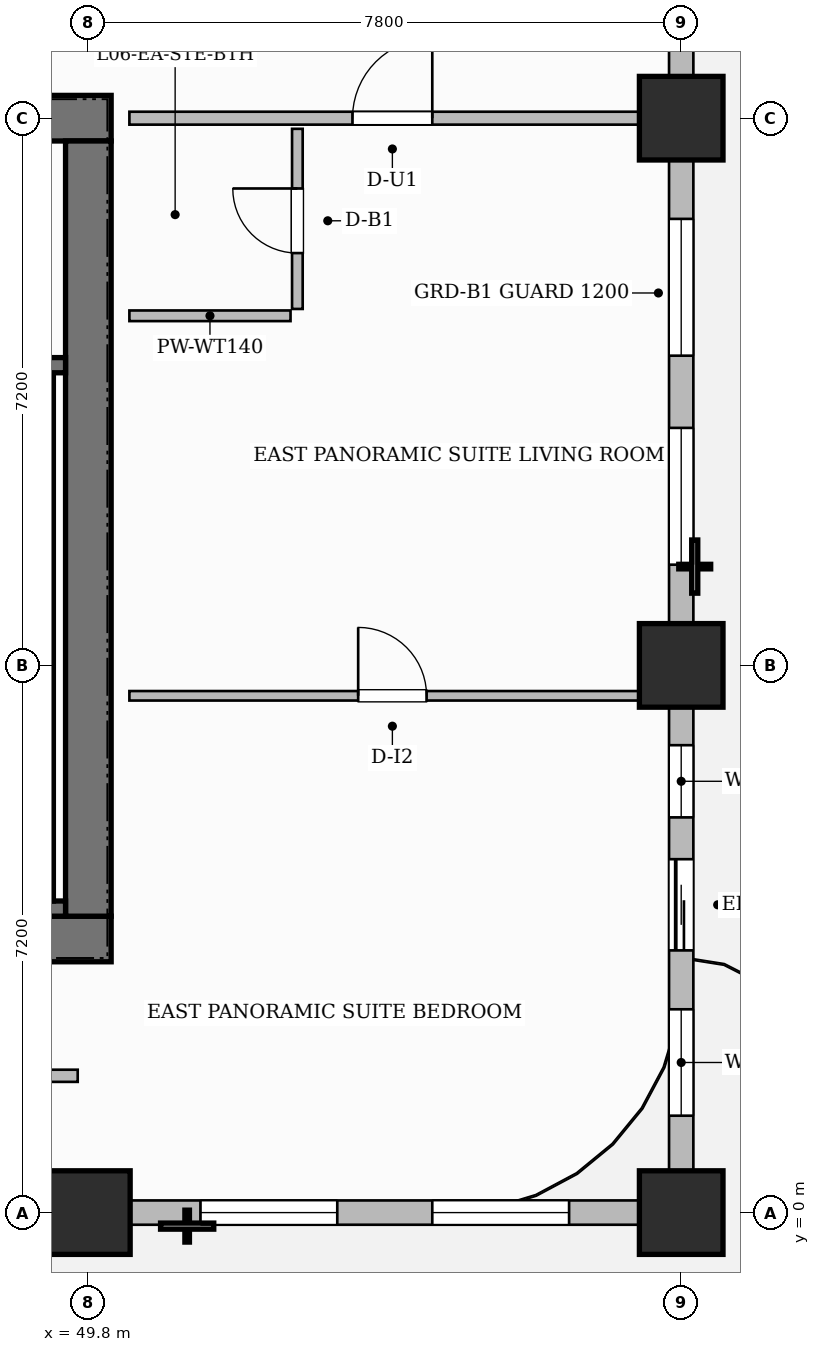
"""IFC4 building model, lengths in metres.
Left out: names, types, materials, properties, quantities, classifications, styles, units other than length and angle.
Written with IfcOpenShell. Run it as: python <this file> out.ifc"""

import sys

from ifc_helpers import new_model, si_unit, direction, frame, frame_2d, origin, origin_2d, place, context, subcontext, project, spatial, rectangle, extrude, source, transform, mapped, element, fill, save


model = new_model("IFC4")
c1 = context("Model", 3, precision=1e-05, world=origin(), true_north=direction((0.0, 1.0)))
c2 = subcontext(c1, "Body", "Model", "MODEL_VIEW")
j1 = project(units=[si_unit("LENGTHUNIT", "METRE"), si_unit("PLANEANGLEUNIT", "RADIAN")], contexts=[c1])
p1 = place(None, origin())
s1 = spatial("IfcSite", under=j1, at=p1, CompositionType="ELEMENT")
p2 = place(p1, origin())
s2 = spatial("IfcBuilding", under=s1, at=p2, CompositionType="ELEMENT")
p3 = place(p2, frame((0.0, 0.0, 32.4)))
s3 = spatial("IfcBuildingStorey", under=s2, at=p3, CompositionType="ELEMENT", Elevation=32.4)
p4 = place(p3, frame((34.5, 3.6, 0.0), z_axis=(0.0, 0.0, 1.0), x_axis=(1.0, 0.0, 0.0)))
e1 = element("IfcWall", 1, at=p4, inside=s3, PredefinedType="SHEAR", context=c2, shape_type="SweptSolid", body=[
    extrude(rectangle(XDim=15.6, YDim=0.6, at=frame_2d((7.8, 0.0))), origin(), (0.0, 0.0, 1.0), 3.7),
])
p5 = place(p4, frame((4.5, 0.0, 0.0)))
e2 = element("IfcOpeningElement", 2, at=p5, cuts=e1, PredefinedType="OPENING", context=c2, shape_type="SweptSolid", body=[
    extrude(rectangle(XDim=0.9, YDim=2.1, at=frame_2d((0.45, 1.05))), frame((0.0, 0.31, 0.0), z_axis=(0.0, -1.0, 0.0), x_axis=(1.0, 0.0, 0.0)), (0.0, 0.0, 1.0), 0.62),
])
p6 = place(p4, frame((6.95, 0.0, 0.0)))
e3 = element("IfcOpeningElement", 3, at=p6, cuts=e1, PredefinedType="OPENING", context=c2, shape_type="SweptSolid", body=[
    extrude(rectangle(XDim=0.9, YDim=2.1, at=frame_2d((0.45, 1.05))), frame((0.0, 0.31, 0.0), z_axis=(0.0, -1.0, 0.0), x_axis=(1.0, 0.0, 0.0)), (0.0, 0.0, 1.0), 0.62),
])
p7 = place(p3, frame((34.5, 14.4, 0.0), z_axis=(0.0, 0.0, 1.0), x_axis=(1.0, 0.0, 0.0)))
e4 = element("IfcWall", 4, at=p7, inside=s3, PredefinedType="SHEAR", context=c2, shape_type="SweptSolid", body=[
    extrude(rectangle(XDim=15.6, YDim=0.6, at=frame_2d((7.8, 0.0))), origin(), (0.0, 0.0, 1.0), 3.7),
])
p8 = place(p7, frame((5.43, 0.0, 0.0)))
e5 = element("IfcOpeningElement", 5, at=p8, cuts=e4, PredefinedType="OPENING", context=c2, shape_type="SweptSolid", body=[
    extrude(rectangle(XDim=1.5, YDim=2.2, at=frame_2d((0.75, 1.1))), frame((0.0, 0.31, 0.0), z_axis=(0.0, -1.0, 0.0), x_axis=(1.0, 0.0, 0.0)), (0.0, 0.0, 1.0), 0.62),
])
p9 = place(p7, frame((1.645, 0.0, 0.0)))
e6 = element("IfcOpeningElement", 6, at=p9, cuts=e4, PredefinedType="OPENING", context=c2, shape_type="SweptSolid", body=[
    extrude(rectangle(XDim=1.05, YDim=2.15, at=frame_2d((0.525, 1.075))), frame((0.0, 0.31, 0.0), z_axis=(0.0, -1.0, 0.0), x_axis=(1.0, 0.0, 0.0)), (0.0, 0.0, 1.0), 0.62),
])
p10 = place(p7, frame((11.275, 0.0, 0.0)))
e7 = element("IfcOpeningElement", 7, at=p10, cuts=e4, PredefinedType="OPENING", context=c2, shape_type="SweptSolid", body=[
    extrude(rectangle(XDim=1.05, YDim=2.15, at=frame_2d((0.525, 1.075))), frame((0.0, 0.31, 0.0), z_axis=(0.0, -1.0, 0.0), x_axis=(1.0, 0.0, 0.0)), (0.0, 0.0, 1.0), 0.62),
])
p11 = place(p3, frame((49.8, 3.9, 0.0), z_axis=(0.0, 0.0, 1.0), x_axis=(0.0, 1.0, 0.0)))
e8 = element("IfcWall", 8, at=p11, inside=s3, PredefinedType="SHEAR", context=c2, shape_type="SweptSolid", body=[
    extrude(rectangle(XDim=10.2, YDim=0.6, at=frame_2d((5.1, 0.0))), origin(), (0.0, 0.0, 1.0), 3.7),
])
m1 = source(origin(), c2, "Body", "SweptSolid", [
    extrude(rectangle(XDim=1.1, YDim=1.1, at=origin_2d()), origin(), (0.0, 0.0, 1.0), 3.7),
])
for number, where, z_axis, x_axis in (
    (9, (49.8, 0.0, 0.0), (0.0, 0.0, 1.0), (1.0, 0.0, 0.0)),
    (10, (57.6, 0.0, 0.0), (0.0, 0.0, 1.0), (1.0, 0.0, 0.0)),
    (11, (57.6, 7.2, 0.0), (0.0, 0.0, 1.0), (1.0, 0.0, 0.0)),
    (12, (57.6, 14.4, 0.0), (0.0, 0.0, 1.0), (1.0, 0.0, 0.0)),
):
    element("IfcColumn", number, at=place(p3, frame(where, z_axis=z_axis, x_axis=x_axis)), inside=s3, PredefinedType="COLUMN", context=c2, shape_type="MappedRepresentation", body=[
        mapped(m1, transform((0.0, 0.0, 0.0), scale=1.0)),
    ])
p12 = place(p3, frame((43.12, 4.0, 0.0), z_axis=(0.0, 0.0, 1.0), x_axis=(1.0, 0.0, 0.0)))
e13 = element("IfcWall", 13, at=p12, inside=s3, PredefinedType="SHEAR", context=c2, shape_type="SweptSolid", body=[
    extrude(rectangle(XDim=6.38, YDim=0.2, at=frame_2d((3.19, 0.0))), origin(), (0.0, 0.0, 1.0), 3.7),
])
p13 = place(p3, frame((49.24, 4.1, 0.0), z_axis=(0.0, 0.0, 1.0), x_axis=(0.0, 1.0, 0.0)))
e14 = element("IfcWall", 14, at=p13, inside=s3, PredefinedType="SHEAR", context=c2, shape_type="SweptSolid", body=[
    extrude(rectangle(XDim=6.95, YDim=0.2, at=frame_2d((3.475, 0.0))), origin(), (0.0, 0.0, 1.0), 3.7),
])
p14 = place(p3, frame((43.12, 11.15, 0.0), z_axis=(0.0, 0.0, 1.0), x_axis=(1.0, 0.0, 0.0)))
e15 = element("IfcWall", 15, at=p14, inside=s3, PredefinedType="SHEAR", context=c2, shape_type="SweptSolid", body=[
    extrude(rectangle(XDim=6.38, YDim=0.2, at=frame_2d((3.19, 0.0))), origin(), (0.0, 0.0, 1.0), 3.7),
])
p15 = place(p14, frame((1.045, 0.0, 0.0)))
e16 = element("IfcOpeningElement", 16, at=p15, cuts=e15, PredefinedType="OPENING", context=c2, shape_type="SweptSolid", body=[
    extrude(rectangle(XDim=1.05, YDim=2.2, at=frame_2d((0.525, 1.1))), frame((0.0, 0.11, 0.0), z_axis=(0.0, -1.0, 0.0), x_axis=(1.0, 0.0, 0.0)), (0.0, 0.0, 1.0), 0.22),
])
p16 = place(p14, frame((4.125, 0.0, 0.0)))
e17 = element("IfcOpeningElement", 17, at=p16, cuts=e15, PredefinedType="OPENING", context=c2, shape_type="SweptSolid", body=[
    extrude(rectangle(XDim=1.05, YDim=2.2, at=frame_2d((0.525, 1.1))), frame((0.0, 0.11, 0.0), z_axis=(0.0, -1.0, 0.0), x_axis=(1.0, 0.0, 0.0)), (0.0, 0.0, 1.0), 0.22),
])
p17 = place(p3, frame((30.29, 1.8, 0.0), z_axis=(0.0, 0.0, 1.0), x_axis=(1.0, 0.0, 0.0)))
e18 = element("IfcWall", 18, at=p17, inside=s3, PredefinedType="PARTITIONING", context=c2, shape_type="SweptSolid", body=[
    extrude(rectangle(XDim=19.37, YDim=0.16, at=frame_2d((9.685, 0.0))), origin(), (0.0, 0.0, 1.0), 3.45),
])
p18 = place(p17, frame((9.735, 0.0, 0.0)))
e19 = element("IfcOpeningElement", 19, at=p18, cuts=e18, PredefinedType="OPENING", context=c2, shape_type="SweptSolid", body=[
    extrude(rectangle(XDim=0.95, YDim=2.15, at=frame_2d((0.475, 1.075))), frame((0.0, 0.09, 0.0), z_axis=(0.0, -1.0, 0.0), x_axis=(1.0, 0.0, 0.0)), (0.0, 0.0, 1.0), 0.18),
])
p19 = place(p3, frame((50.34, 14.4, 0.0), z_axis=(0.0, 0.0, 1.0), x_axis=(1.0, 0.0, 0.0)))
e20 = element("IfcWall", 20, at=p19, inside=s3, PredefinedType="PARTITIONING", context=c2, shape_type="SweptSolid", body=[
    extrude(rectangle(XDim=7.07, YDim=0.17, at=frame_2d((3.535, 0.0))), origin(), (0.0, 0.0, 1.0), 2.885),
])
p20 = place(p19, frame((2.935, 0.0, 0.0)))
e21 = element("IfcOpeningElement", 21, at=p20, cuts=e20, PredefinedType="OPENING", context=c2, shape_type="SweptSolid", body=[
    extrude(rectangle(XDim=1.05, YDim=2.25, at=frame_2d((0.525, 1.125))), frame((0.0, 0.095, 0.0), z_axis=(0.0, -1.0, 0.0), x_axis=(1.0, 0.0, 0.0)), (0.0, 0.0, 1.0), 0.19),
])
p21 = place(p3, frame((52.55, 11.89, 0.0), z_axis=(0.0, 0.0, 1.0), x_axis=(0.0, 1.0, 0.0)))
e22 = element("IfcWall", 22, at=p21, inside=s3, PredefinedType="PARTITIONING", context=c2, shape_type="SweptSolid", body=[
    extrude(rectangle(XDim=2.37, YDim=0.14, at=frame_2d((1.185, 0.0))), origin(), (0.0, 0.0, 1.0), 3.45),
])
p22 = place(p21, frame((0.735, 0.0, 0.0)))
e23 = element("IfcOpeningElement", 23, at=p22, cuts=e22, PredefinedType="OPENING", context=c2, shape_type="SweptSolid", body=[
    extrude(rectangle(XDim=0.85, YDim=2.1, at=frame_2d((0.425, 1.05))), frame((0.0, 0.08, 0.0), z_axis=(0.0, -1.0, 0.0), x_axis=(1.0, 0.0, 0.0)), (0.0, 0.0, 1.0), 0.16),
])
p23 = place(p3, frame((50.34, 11.8, 0.0), z_axis=(0.0, 0.0, 1.0), x_axis=(1.0, 0.0, 0.0)))
e24 = element("IfcWall", 24, at=p23, inside=s3, PredefinedType="PARTITIONING", context=c2, shape_type="SweptSolid", body=[
    extrude(rectangle(XDim=2.12, YDim=0.14, at=frame_2d((1.06, 0.0))), origin(), (0.0, 0.0, 1.0), 3.45),
])
p24 = place(p3, frame((50.34, 6.8, 0.0), z_axis=(0.0, 0.0, 1.0), x_axis=(1.0, 0.0, 0.0)))
e25 = element("IfcWall", 25, at=p24, inside=s3, PredefinedType="PARTITIONING", context=c2, shape_type="SweptSolid", body=[
    extrude(rectangle(XDim=7.07, YDim=0.125, at=frame_2d((3.535, 0.0))), origin(), (0.0, 0.0, 1.0), 3.45),
])
p25 = place(p24, frame((3.01, 0.0, 0.0)))
e26 = element("IfcOpeningElement", 26, at=p25, cuts=e25, PredefinedType="OPENING", context=c2, shape_type="SweptSolid", body=[
    extrude(rectangle(XDim=0.9, YDim=2.15, at=frame_2d((0.45, 1.075))), frame((0.0, 0.073, 0.0), z_axis=(0.0, -1.0, 0.0), x_axis=(1.0, 0.0, 0.0)), (0.0, 0.0, 1.0), 0.145),
])
p26 = place(p3, frame((14.4, 0.0, 0.0), z_axis=(0.0, 0.0, 1.0), x_axis=(1.0, 0.0, 0.0)))
e27 = element("IfcWall", 27, at=p26, inside=s3, PredefinedType="SOLIDWALL", context=c2, shape_type="SweptSolid", body=[
    extrude(rectangle(XDim=43.2, YDim=0.32, at=frame_2d((21.6, 0.0))), origin(), (0.0, 0.0, 1.0), 2.885),
])
p27 = place(p26, frame((1.5, 0.0, 0.0)))
e28 = element("IfcOpeningElement", 28, at=p27, cuts=e27, PredefinedType="OPENING", context=c2, shape_type="SweptSolid", body=[
    extrude(rectangle(XDim=1.2, YDim=2.2, at=frame_2d((0.6, 1.1))), frame((0.0, 0.17, 0.0), z_axis=(0.0, -1.0, 0.0), x_axis=(1.0, 0.0, 0.0)), (0.0, 0.0, 1.0), 0.34),
])
p28 = place(p26, frame((3.336, 0.0, 0.8)))
e29 = element("IfcOpeningElement", 29, at=p28, cuts=e27, PredefinedType="OPENING", context=c2, shape_type="SweptSolid", body=[
    extrude(rectangle(XDim=1.4, YDim=1.85, at=frame_2d((0.7, 0.925))), frame((0.0, 0.17, 0.0), z_axis=(0.0, -1.0, 0.0), x_axis=(1.0, 0.0, 0.0)), (0.0, 0.0, 1.0), 0.34),
])
p29 = place(p26, frame((5.269, 0.0, 0.8)))
e30 = element("IfcOpeningElement", 30, at=p29, cuts=e27, PredefinedType="OPENING", context=c2, shape_type="SweptSolid", body=[
    extrude(rectangle(XDim=0.95, YDim=1.75, at=frame_2d((0.475, 0.875))), frame((0.0, 0.17, 0.0), z_axis=(0.0, -1.0, 0.0), x_axis=(1.0, 0.0, 0.0)), (0.0, 0.0, 1.0), 0.34),
])
p30 = place(p26, frame((8.389, 0.0, 0.8)))
e31 = element("IfcOpeningElement", 31, at=p30, cuts=e27, PredefinedType="OPENING", context=c2, shape_type="SweptSolid", body=[
    extrude(rectangle(XDim=1.8, YDim=1.85, at=frame_2d((0.9, 0.925))), frame((0.0, 0.17, 0.0), z_axis=(0.0, -1.0, 0.0), x_axis=(1.0, 0.0, 0.0)), (0.0, 0.0, 1.0), 0.34),
])
p31 = place(p26, frame((11.197, 0.0, 0.8)))
e32 = element("IfcOpeningElement", 32, at=p31, cuts=e27, PredefinedType="OPENING", context=c2, shape_type="SweptSolid", body=[
    extrude(rectangle(XDim=1.8, YDim=1.85, at=frame_2d((0.9, 0.925))), frame((0.0, 0.17, 0.0), z_axis=(0.0, -1.0, 0.0), x_axis=(1.0, 0.0, 0.0)), (0.0, 0.0, 1.0), 0.34),
])
p32 = place(p26, frame((16.804, 0.0, 0.8)))
e33 = element("IfcOpeningElement", 33, at=p32, cuts=e27, PredefinedType="OPENING", context=c2, shape_type="SweptSolid", body=[
    extrude(rectangle(XDim=1.8, YDim=1.85, at=frame_2d((0.9, 0.925))), frame((0.0, 0.17, 0.0), z_axis=(0.0, -1.0, 0.0), x_axis=(1.0, 0.0, 0.0)), (0.0, 0.0, 1.0), 0.34),
])
p33 = place(p26, frame((21.725, 0.0, 0.8)))
e34 = element("IfcOpeningElement", 34, at=p33, cuts=e27, PredefinedType="OPENING", context=c2, shape_type="SweptSolid", body=[
    extrude(rectangle(XDim=1.8, YDim=1.85, at=frame_2d((0.9, 0.925))), frame((0.0, 0.17, 0.0), z_axis=(0.0, -1.0, 0.0), x_axis=(1.0, 0.0, 0.0)), (0.0, 0.0, 1.0), 0.34),
])
p34 = place(p26, frame((24.475, 0.0, 0.8)))
e35 = element("IfcOpeningElement", 35, at=p34, cuts=e27, PredefinedType="OPENING", context=c2, shape_type="SweptSolid", body=[
    extrude(rectangle(XDim=1.8, YDim=1.85, at=frame_2d((0.9, 0.925))), frame((0.0, 0.17, 0.0), z_axis=(0.0, -1.0, 0.0), x_axis=(1.0, 0.0, 0.0)), (0.0, 0.0, 1.0), 0.34),
])
p35 = place(p26, frame((29.075, 0.0, 0.8)))
e36 = element("IfcOpeningElement", 36, at=p35, cuts=e27, PredefinedType="OPENING", context=c2, shape_type="SweptSolid", body=[
    extrude(rectangle(XDim=1.8, YDim=1.85, at=frame_2d((0.9, 0.925))), frame((0.0, 0.17, 0.0), z_axis=(0.0, -1.0, 0.0), x_axis=(1.0, 0.0, 0.0)), (0.0, 0.0, 1.0), 0.34),
])
p36 = place(p26, frame((32.125, 0.0, 0.8)))
e37 = element("IfcOpeningElement", 37, at=p36, cuts=e27, PredefinedType="OPENING", context=c2, shape_type="SweptSolid", body=[
    extrude(rectangle(XDim=1.8, YDim=1.85, at=frame_2d((0.9, 0.925))), frame((0.0, 0.17, 0.0), z_axis=(0.0, -1.0, 0.0), x_axis=(1.0, 0.0, 0.0)), (0.0, 0.0, 1.0), 0.34),
])
p37 = place(p26, frame((36.875, 0.0, 0.8)))
e38 = element("IfcOpeningElement", 38, at=p37, cuts=e27, PredefinedType="OPENING", context=c2, shape_type="SweptSolid", body=[
    extrude(rectangle(XDim=1.8, YDim=1.85, at=frame_2d((0.9, 0.925))), frame((0.0, 0.17, 0.0), z_axis=(0.0, -1.0, 0.0), x_axis=(1.0, 0.0, 0.0)), (0.0, 0.0, 1.0), 0.34),
])
p38 = place(p26, frame((39.925, 0.0, 0.8)))
e39 = element("IfcOpeningElement", 39, at=p38, cuts=e27, PredefinedType="OPENING", context=c2, shape_type="SweptSolid", body=[
    extrude(rectangle(XDim=1.8, YDim=1.85, at=frame_2d((0.9, 0.925))), frame((0.0, 0.17, 0.0), z_axis=(0.0, -1.0, 0.0), x_axis=(1.0, 0.0, 0.0)), (0.0, 0.0, 1.0), 0.34),
])
p39 = place(p3, frame((57.6, 0.05, 0.0), z_axis=(0.0, 0.0, 1.0), x_axis=(0.0, 1.0, 0.0)))
e40 = element("IfcWall", 40, at=p39, inside=s3, PredefinedType="SOLIDWALL", context=c2, shape_type="SweptSolid", body=[
    extrude(rectangle(XDim=21.5, YDim=0.32, at=frame_2d((10.75, 0.0))), origin(), (0.0, 0.0, 1.0), 2.885),
])
p40 = place(p39, frame((3.4, 0.0, 0.0)))
e41 = element("IfcOpeningElement", 41, at=p40, cuts=e40, PredefinedType="OPENING", context=c2, shape_type="SweptSolid", body=[
    extrude(rectangle(XDim=1.2, YDim=2.2, at=frame_2d((0.6, 1.1))), frame((0.0, 0.17, 0.0), z_axis=(0.0, -1.0, 0.0), x_axis=(1.0, 0.0, 0.0)), (0.0, 0.0, 1.0), 0.34),
])
p41 = place(p39, frame((1.225, 0.0, 0.8)))
e42 = element("IfcOpeningElement", 42, at=p41, cuts=e40, PredefinedType="OPENING", context=c2, shape_type="SweptSolid", body=[
    extrude(rectangle(XDim=1.4, YDim=1.85, at=frame_2d((0.7, 0.925))), frame((0.0, 0.17, 0.0), z_axis=(0.0, -1.0, 0.0), x_axis=(1.0, 0.0, 0.0)), (0.0, 0.0, 1.0), 0.34),
])
p42 = place(p39, frame((5.15, 0.0, 0.8)))
e43 = element("IfcOpeningElement", 43, at=p42, cuts=e40, PredefinedType="OPENING", context=c2, shape_type="SweptSolid", body=[
    extrude(rectangle(XDim=0.95, YDim=1.75, at=frame_2d((0.475, 0.875))), frame((0.0, 0.17, 0.0), z_axis=(0.0, -1.0, 0.0), x_axis=(1.0, 0.0, 0.0)), (0.0, 0.0, 1.0), 0.34),
])
p43 = place(p39, frame((8.475, 0.0, 0.8)))
e44 = element("IfcOpeningElement", 44, at=p43, cuts=e40, PredefinedType="OPENING", context=c2, shape_type="SweptSolid", body=[
    extrude(rectangle(XDim=1.8, YDim=1.85, at=frame_2d((0.9, 0.925))), frame((0.0, 0.17, 0.0), z_axis=(0.0, -1.0, 0.0), x_axis=(1.0, 0.0, 0.0)), (0.0, 0.0, 1.0), 0.34),
])
p44 = place(p39, frame((11.225, 0.0, 0.8)))
e45 = element("IfcOpeningElement", 45, at=p44, cuts=e40, PredefinedType="OPENING", context=c2, shape_type="SweptSolid", body=[
    extrude(rectangle(XDim=1.8, YDim=1.85, at=frame_2d((0.9, 0.925))), frame((0.0, 0.17, 0.0), z_axis=(0.0, -1.0, 0.0), x_axis=(1.0, 0.0, 0.0)), (0.0, 0.0, 1.0), 0.34),
])
p45 = place(p39, frame((17.679, 0.0, 0.8)))
e46 = element("IfcOpeningElement", 46, at=p45, cuts=e40, PredefinedType="OPENING", context=c2, shape_type="SweptSolid", body=[
    extrude(rectangle(XDim=1.8, YDim=1.85, at=frame_2d((0.9, 0.925))), frame((0.0, 0.17, 0.0), z_axis=(0.0, -1.0, 0.0), x_axis=(1.0, 0.0, 0.0)), (0.0, 0.0, 1.0), 0.34),
])
m2 = source(origin(), c2, "Body", "SweptSolid", [
    extrude(rectangle(XDim=1.05, YDim=2.25, at=frame_2d((0.525, 1.125))), frame((0.0, 0.025, 0.0), z_axis=(0.0, -1.0, 0.0), x_axis=(1.0, 0.0, 0.0)), (0.0, 0.0, 1.0), 0.05),
])
p46 = place(p20, origin())
e47 = element("IfcDoor", 47, at=p46, inside=s3, OperationType="SINGLE_SWING_RIGHT", PredefinedType="DOOR", context=c2, shape_type="MappedRepresentation", body=[
    mapped(m2, transform((0.0, 0.0, 0.0), scale=1.0)),
])
fill(e21, e47)
m3 = source(origin(), c2, "Body", "SweptSolid", [
    extrude(rectangle(XDim=0.85, YDim=2.1, at=frame_2d((0.425, 1.05))), frame((0.0, 0.025, 0.0), z_axis=(0.0, -1.0, 0.0), x_axis=(1.0, 0.0, 0.0)), (0.0, 0.0, 1.0), 0.05),
])
p47 = place(p22, origin())
e48 = element("IfcDoor", 48, at=p47, inside=s3, OperationType="SINGLE_SWING_RIGHT", PredefinedType="DOOR", context=c2, shape_type="MappedRepresentation", body=[
    mapped(m3, transform((0.0, 0.0, 0.0), scale=1.0)),
])
fill(e23, e48)
m4 = source(origin(), c2, "Body", "SweptSolid", [
    extrude(rectangle(XDim=0.9, YDim=2.15, at=frame_2d((0.45, 1.075))), frame((0.0, 0.025, 0.0), z_axis=(0.0, -1.0, 0.0), x_axis=(1.0, 0.0, 0.0)), (0.0, 0.0, 1.0), 0.05),
])
p48 = place(p25, origin())
e49 = element("IfcDoor", 49, at=p48, inside=s3, OperationType="SINGLE_SWING_LEFT", PredefinedType="DOOR", context=c2, shape_type="MappedRepresentation", body=[
    mapped(m4, transform((0.0, 0.0, 0.0), scale=1.0)),
])
fill(e26, e49)
m5 = source(origin(), c2, "Body", "SweptSolid", [
    extrude(rectangle(XDim=1.2, YDim=2.2, at=frame_2d((0.6, 1.1))), frame((0.0, 0.025, 0.0), z_axis=(0.0, -1.0, 0.0), x_axis=(1.0, 0.0, 0.0)), (0.0, 0.0, 1.0), 0.05),
])
p49 = place(p40, origin())
e50 = element("IfcDoor", 50, at=p49, inside=s3, OperationType="SLIDING_TO_LEFT", PredefinedType="DOOR", context=c2, shape_type="MappedRepresentation", body=[
    mapped(m5, transform((0.0, 0.0, 0.0), scale=1.0)),
])
fill(e41, e50)
m6 = source(origin(), c2, "Body", "SweptSolid", [
    extrude(rectangle(XDim=1.8, YDim=1.85, at=frame_2d((0.9, 0.925))), frame((0.0, 0.03, 0.0), z_axis=(0.0, -1.0, 0.0), x_axis=(1.0, 0.0, 0.0)), (0.0, 0.0, 1.0), 0.06),
])
p50 = place(p37, origin())
e51 = element("IfcWindow", 51, at=p50, inside=s3, PartitioningType="DOUBLE_PANEL_VERTICAL", PredefinedType="WINDOW", context=c2, shape_type="MappedRepresentation", body=[
    mapped(m6, transform((0.0, 0.0, 0.0), scale=1.0)),
])
fill(e38, e51)
p51 = place(p38, origin())
e52 = element("IfcWindow", 52, at=p51, inside=s3, PartitioningType="DOUBLE_PANEL_VERTICAL", PredefinedType="WINDOW", context=c2, shape_type="MappedRepresentation", body=[
    mapped(m6, transform((0.0, 0.0, 0.0), scale=1.0)),
])
fill(e39, e52)
m7 = source(origin(), c2, "Body", "SweptSolid", [
    extrude(rectangle(XDim=1.4, YDim=1.85, at=frame_2d((0.7, 0.925))), frame((0.0, 0.03, 0.0), z_axis=(0.0, -1.0, 0.0), x_axis=(1.0, 0.0, 0.0)), (0.0, 0.0, 1.0), 0.06),
])
p52 = place(p41, origin())
e53 = element("IfcWindow", 53, at=p52, inside=s3, PartitioningType="SINGLE_PANEL", PredefinedType="WINDOW", context=c2, shape_type="MappedRepresentation", body=[
    mapped(m7, transform((0.0, 0.0, 0.0), scale=1.0)),
])
fill(e42, e53)
m8 = source(origin(), c2, "Body", "SweptSolid", [
    extrude(rectangle(XDim=0.95, YDim=1.75, at=frame_2d((0.475, 0.875))), frame((0.0, 0.03, 0.0), z_axis=(0.0, -1.0, 0.0), x_axis=(1.0, 0.0, 0.0)), (0.0, 0.0, 1.0), 0.06),
])
p53 = place(p42, origin())
e54 = element("IfcWindow", 54, at=p53, inside=s3, PartitioningType="SINGLE_PANEL", PredefinedType="WINDOW", context=c2, shape_type="MappedRepresentation", body=[
    mapped(m8, transform((0.0, 0.0, 0.0), scale=1.0)),
])
fill(e43, e54)
p54 = place(p43, origin())
e55 = element("IfcWindow", 55, at=p54, inside=s3, PartitioningType="DOUBLE_PANEL_VERTICAL", PredefinedType="WINDOW", context=c2, shape_type="MappedRepresentation", body=[
    mapped(m6, transform((0.0, 0.0, 0.0), scale=1.0)),
])
fill(e44, e55)
p55 = place(p44, origin())
e56 = element("IfcWindow", 56, at=p55, inside=s3, PartitioningType="DOUBLE_PANEL_VERTICAL", PredefinedType="WINDOW", context=c2, shape_type="MappedRepresentation", body=[
    mapped(m6, transform((0.0, 0.0, 0.0), scale=1.0)),
])
fill(e45, e56)
save(model, sys.argv[1])
